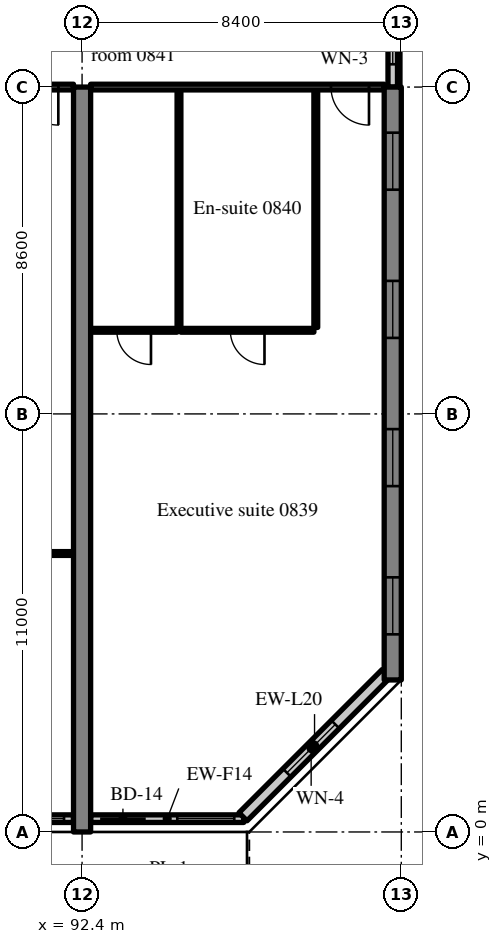
"""IFC4 building model, lengths in metres.
Left out: names, types, materials, properties, quantities, classifications, styles, units other than length and angle.
Written with IfcOpenShell. Run it as: python <this file> out.ifc"""

import sys

from ifc_helpers import new_model, si_unit, direction, frame, frame_2d, origin, place, context, subcontext, project, spatial, rectangle, extrude, source, transform, mapped, element, fill, save


model = new_model("IFC4")
c1 = context("Model", 3, precision=1e-05, world=origin(), true_north=direction((0.0, 1.0)))
c2 = subcontext(c1, "Body", "Model", "MODEL_VIEW")
j1 = project(units=[si_unit("LENGTHUNIT", "METRE"), si_unit("PLANEANGLEUNIT", "RADIAN")], contexts=[c1])
p1 = place(None, origin())
s1 = spatial("IfcSite", under=j1, at=p1, CompositionType="ELEMENT")
p2 = place(p1, origin())
s2 = spatial("IfcBuilding", under=s1, at=p2, CompositionType="ELEMENT")
p3 = place(p2, frame((0.0, 0.0, 39.2)))
s3 = spatial("IfcBuildingStorey", under=s2, at=p3, CompositionType="ELEMENT", Elevation=39.2)
m1 = source(origin(), c2, "Body", "SweptSolid", [
    extrude(rectangle(XDim=19.6, YDim=0.45, at=frame_2d((9.8, 0.0))), origin(), (0.0, 0.0, 1.0), 3.52),
])
p4 = place(p3, frame((92.4, 0.0, 0.0), z_axis=(0.0, 0.0, 1.0), x_axis=(0.0, 1.0, 0.0)))
e1 = element("IfcWall", 1, at=p4, inside=s3, PredefinedType="SHEAR", context=c2, shape_type="MappedRepresentation", body=[
    mapped(m1, transform((0.0, 0.0, 0.0), scale=1.0)),
])
m2 = source(origin(), c2, "Body", "SweptSolid", [
    extrude(rectangle(XDim=15.6, YDim=0.45, at=frame_2d((7.8, 0.0))), origin(), (0.0, 0.0, 1.0), 3.52),
])
p5 = place(p3, frame((100.575, 4.0, 0.0), z_axis=(0.0, 0.0, 1.0), x_axis=(0.0, 1.0, 0.0)))
e2 = element("IfcWall", 2, at=p5, inside=s3, PredefinedType="SHEAR", context=c2, shape_type="MappedRepresentation", body=[
    mapped(m2, transform((0.0, 0.0, 0.0), scale=1.0)),
])
m3 = source(origin(), c2, "Body", "SweptSolid", [
    extrude(rectangle(XDim=1.5, YDim=1.5, at=frame_2d((0.75, 0.75))), frame((0.0, 0.235, 0.0), z_axis=(0.0, -1.0, 0.0), x_axis=(1.0, 0.0, 0.0)), (0.0, 0.0, 1.0), 0.47),
])
p6 = place(p5, frame((1.2, 0.0, 0.9)))
e3 = element("IfcOpeningElement", 3, at=p6, cuts=e2, PredefinedType="OPENING", context=c2, shape_type="MappedRepresentation", body=[
    mapped(m3, transform((0.0, 0.0, 0.0), scale=1.0)),
])
p7 = place(p5, frame((5.1, 0.0, 0.9)))
e4 = element("IfcOpeningElement", 4, at=p7, cuts=e2, PredefinedType="OPENING", context=c2, shape_type="MappedRepresentation", body=[
    mapped(m3, transform((0.0, 0.0, 0.0), scale=1.0)),
])
p8 = place(p5, frame((9.0, 0.0, 0.9)))
e5 = element("IfcOpeningElement", 5, at=p8, cuts=e2, PredefinedType="OPENING", context=c2, shape_type="MappedRepresentation", body=[
    mapped(m3, transform((0.0, 0.0, 0.0), scale=1.0)),
])
p9 = place(p5, frame((12.9, 0.0, 0.9)))
e6 = element("IfcOpeningElement", 6, at=p9, cuts=e2, PredefinedType="OPENING", context=c2, shape_type="MappedRepresentation", body=[
    mapped(m3, transform((0.0, 0.0, 0.0), scale=1.0)),
])
m4 = source(origin(), c2, "Body", "SweptSolid", [
    extrude(rectangle(XDim=3.525, YDim=0.2, at=frame_2d((1.763, 0.0))), origin(), (0.0, 0.0, 1.0), 2.77),
])
p10 = place(p3, frame((88.65, 0.35, 0.0), z_axis=(0.0, 0.0, 1.0), x_axis=(1.0, 0.0, 0.0)))
e7 = element("IfcWall", 7, at=p10, inside=s3, PredefinedType="SOLIDWALL", context=c2, shape_type="MappedRepresentation", body=[
    mapped(m4, transform((0.0, 0.0, 0.0), scale=1.0)),
])
m5 = source(origin(), c2, "Body", "SweptSolid", [
    extrude(rectangle(XDim=1.2, YDim=2.4, at=frame_2d((0.6, 1.2))), frame((0.0, 0.11, 0.0), z_axis=(0.0, -1.0, 0.0), x_axis=(1.0, 0.0, 0.0)), (0.0, 0.0, 1.0), 0.22),
])
p11 = place(p10, frame((0.25, 0.0, 0.0)))
e8 = element("IfcOpeningElement", 8, at=p11, cuts=e7, PredefinedType="OPENING", context=c2, shape_type="MappedRepresentation", body=[
    mapped(m5, transform((0.0, 0.0, 0.0), scale=1.0)),
])
m6 = source(origin(), c2, "Body", "SweptSolid", [
    extrude(rectangle(XDim=1.5, YDim=1.5, at=frame_2d((0.75, 0.75))), frame((0.0, 0.11, 0.0), z_axis=(0.0, -1.0, 0.0), x_axis=(1.0, 0.0, 0.0)), (0.0, 0.0, 1.0), 0.22),
])
p12 = place(p10, frame((1.775, 0.0, 0.9)))
e9 = element("IfcOpeningElement", 9, at=p12, cuts=e7, PredefinedType="OPENING", context=c2, shape_type="MappedRepresentation", body=[
    mapped(m6, transform((0.0, 0.0, 0.0), scale=1.0)),
])
m7 = source(origin(), c2, "Body", "SweptSolid", [
    extrude(rectangle(XDim=4.03, YDim=0.2, at=frame_2d((2.015, 0.0))), origin(), (0.0, 0.0, 1.0), 2.77),
])
p13 = place(p3, frame((92.625, 0.35, 0.0), z_axis=(0.0, 0.0, 1.0), x_axis=(1.0, 0.0, 0.0)))
e10 = element("IfcWall", 10, at=p13, inside=s3, PredefinedType="SOLIDWALL", context=c2, shape_type="MappedRepresentation", body=[
    mapped(m7, transform((0.0, 0.0, 0.0), scale=1.0)),
])
p14 = place(p13, frame((0.25, 0.0, 0.0)))
e11 = element("IfcOpeningElement", 11, at=p14, cuts=e10, PredefinedType="OPENING", context=c2, shape_type="MappedRepresentation", body=[
    mapped(m5, transform((0.0, 0.0, 0.0), scale=1.0)),
])
p15 = place(p13, frame((2.28, 0.0, 0.9)))
e12 = element("IfcOpeningElement", 12, at=p15, cuts=e10, PredefinedType="OPENING", context=c2, shape_type="MappedRepresentation", body=[
    mapped(m6, transform((0.0, 0.0, 0.0), scale=1.0)),
])
m8 = source(origin(), c2, "Body", "SweptSolid", [
    extrude(rectangle(XDim=5.326, YDim=0.3, at=frame_2d((2.663, 0.0))), origin(), (0.0, 0.0, 1.0), 3.52),
])
p16 = place(p3, frame((96.634, 0.4, 0.0), z_axis=(0.0, 0.0, 1.0), x_axis=(0.707083859269, 0.707129702361, 0.0)))
e13 = element("IfcWall", 13, at=p16, inside=s3, PredefinedType="SOLIDWALL", context=c2, shape_type="MappedRepresentation", body=[
    mapped(m8, transform((0.0, 0.0, 0.0), scale=1.0)),
])
m9 = source(origin(), c2, "Body", "SweptSolid", [
    extrude(rectangle(XDim=1.8, YDim=1.5, at=frame_2d((0.9, 0.75))), frame((0.0, 0.16, 0.0), z_axis=(0.0, -1.0, 0.0), x_axis=(1.0, 0.0, 0.0)), (0.0, 0.0, 1.0), 0.32),
])
p17 = place(p16, frame((1.636, 0.0, 0.9)))
e14 = element("IfcOpeningElement", 14, at=p17, cuts=e13, PredefinedType="OPENING", context=c2, shape_type="MappedRepresentation", body=[
    mapped(m9, transform((0.0, 0.0, 0.0), scale=1.0)),
])
m10 = source(origin(), c2, "Body", "SweptSolid", [
    extrude(rectangle(XDim=2.4, YDim=0.25, at=frame_2d((1.2, 0.0))), origin(), (0.0, 0.0, 1.0), 2.62),
])
p18 = place(p3, frame((100.575, 19.6, 0.0), z_axis=(0.0, 0.0, 1.0), x_axis=(0.0, 1.0, 0.0)))
e15 = element("IfcWall", 15, at=p18, inside=s3, PredefinedType="SOLIDWALL", context=c2, shape_type="MappedRepresentation", body=[
    mapped(m10, transform((0.0, 0.0, 0.0), scale=1.0)),
])
m11 = source(origin(), c2, "Body", "SweptSolid", [
    extrude(rectangle(XDim=1.2, YDim=1.5, at=frame_2d((0.6, 0.75))), frame((0.0, 0.135, 0.0), z_axis=(0.0, -1.0, 0.0), x_axis=(1.0, 0.0, 0.0)), (0.0, 0.0, 1.0), 0.27),
])
p19 = place(p18, frame((0.6, 0.0, 0.9)))
e16 = element("IfcOpeningElement", 16, at=p19, cuts=e15, PredefinedType="OPENING", context=c2, shape_type="MappedRepresentation", body=[
    mapped(m11, transform((0.0, 0.0, 0.0), scale=1.0)),
])
m12 = source(origin(), c2, "Body", "SweptSolid", [
    extrude(rectangle(XDim=7.95, YDim=0.1, at=frame_2d((3.975, 0.0))), origin(), (0.0, 0.0, 1.0), 3.52),
])
p20 = place(p3, frame((84.225, 7.327, 0.0), z_axis=(0.0, 0.0, 1.0), x_axis=(1.0, 0.0, 0.0)))
e17 = element("IfcWall", 17, at=p20, inside=s3, PredefinedType="PARTITIONING", context=c2, shape_type="MappedRepresentation", body=[
    mapped(m12, transform((0.0, 0.0, 0.0), scale=1.0)),
])
m13 = source(origin(), c2, "Body", "SweptSolid", [
    extrude(rectangle(XDim=1.8, YDim=2.1, at=frame_2d((0.9, 1.05))), frame((0.0, 0.06, 0.0), z_axis=(0.0, -1.0, 0.0), x_axis=(1.0, 0.0, 0.0)), (0.0, 0.0, 1.0), 0.12),
])
p21 = place(p20, frame((3.075, 0.0, 0.0)))
e18 = element("IfcOpeningElement", 18, at=p21, cuts=e17, PredefinedType="OPENING", context=c2, shape_type="MappedRepresentation", body=[
    mapped(m13, transform((0.0, 0.0, 0.0), scale=1.0)),
])
m14 = source(origin(), c2, "Body", "SweptSolid", [
    extrude(rectangle(XDim=7.95, YDim=0.15, at=frame_2d((3.975, 0.0))), origin(), (0.0, 0.0, 1.0), 2.82),
])
p22 = place(p3, frame((84.225, 19.6, 0.0), z_axis=(0.0, 0.0, 1.0), x_axis=(1.0, 0.0, 0.0)))
e19 = element("IfcWall", 19, at=p22, inside=s3, PredefinedType="PARTITIONING", context=c2, shape_type="MappedRepresentation", body=[
    mapped(m14, transform((0.0, 0.0, 0.0), scale=1.0)),
])
m15 = source(origin(), c2, "Body", "SweptSolid", [
    extrude(rectangle(XDim=1.0, YDim=2.1, at=frame_2d((0.5, 1.05))), frame((0.0, 0.085, 0.0), z_axis=(0.0, -1.0, 0.0), x_axis=(1.0, 0.0, 0.0)), (0.0, 0.0, 1.0), 0.17),
])
p23 = place(p22, frame((6.55, 0.0, 0.0)))
e20 = element("IfcOpeningElement", 20, at=p23, cuts=e19, PredefinedType="OPENING", context=c2, shape_type="MappedRepresentation", body=[
    mapped(m15, transform((0.0, 0.0, 0.0), scale=1.0)),
])
m16 = source(origin(), c2, "Body", "SweptSolid", [
    extrude(rectangle(XDim=6.25, YDim=0.1, at=frame_2d((3.125, 0.0))), origin(), (0.0, 0.0, 1.0), 3.52),
])
for number, where, z_axis, x_axis in (
    (21, (98.55, 13.275, 0.0), (0.0, 0.0, 1.0), (0.0, 1.0, 0.0)),
    (22, (94.95, 13.275, 0.0), (0.0, 0.0, 1.0), (0.0, 1.0, 0.0)),
):
    element("IfcWall", number, at=place(p3, frame(where, z_axis=z_axis, x_axis=x_axis)), inside=s3, PredefinedType="PARTITIONING", context=c2, shape_type="MappedRepresentation", body=[
        mapped(m16, transform((0.0, 0.0, 0.0), scale=1.0)),
    ])
m17 = source(origin(), c2, "Body", "SweptSolid", [
    extrude(rectangle(XDim=3.5, YDim=0.1, at=frame_2d((1.75, 0.0))), origin(), (0.0, 0.0, 1.0), 3.52),
])
p24 = place(p3, frame((95.0, 13.2, 0.0), z_axis=(0.0, 0.0, 1.0), x_axis=(1.0, 0.0, 0.0)))
e23 = element("IfcWall", 23, at=p24, inside=s3, PredefinedType="PARTITIONING", context=c2, shape_type="MappedRepresentation", body=[
    mapped(m17, transform((0.0, 0.0, 0.0), scale=1.0)),
])
m18 = source(origin(), c2, "Body", "SweptSolid", [
    extrude(rectangle(XDim=0.9, YDim=2.1, at=frame_2d((0.45, 1.05))), frame((0.0, 0.06, 0.0), z_axis=(0.0, -1.0, 0.0), x_axis=(1.0, 0.0, 0.0)), (0.0, 0.0, 1.0), 0.12),
])
p25 = place(p24, frame((1.3, 0.0, 0.0)))
e24 = element("IfcOpeningElement", 24, at=p25, cuts=e23, PredefinedType="OPENING", context=c2, shape_type="MappedRepresentation", body=[
    mapped(m18, transform((0.0, 0.0, 0.0), scale=1.0)),
])
m19 = source(origin(), c2, "Body", "SweptSolid", [
    extrude(rectangle(XDim=2.275, YDim=0.1, at=frame_2d((1.137, 0.0))), origin(), (0.0, 0.0, 1.0), 3.52),
])
p26 = place(p3, frame((92.625, 13.2, 0.0), z_axis=(0.0, 0.0, 1.0), x_axis=(1.0, 0.0, 0.0)))
e25 = element("IfcWall", 25, at=p26, inside=s3, PredefinedType="PARTITIONING", context=c2, shape_type="MappedRepresentation", body=[
    mapped(m19, transform((0.0, 0.0, 0.0), scale=1.0)),
])
p27 = place(p26, frame((0.688, 0.0, 0.0)))
e26 = element("IfcOpeningElement", 26, at=p27, cuts=e25, PredefinedType="OPENING", context=c2, shape_type="MappedRepresentation", body=[
    mapped(m18, transform((0.0, 0.0, 0.0), scale=1.0)),
])
m20 = source(origin(), c2, "Body", "SweptSolid", [
    extrude(rectangle(XDim=7.725, YDim=0.15, at=frame_2d((3.863, 0.0))), origin(), (0.0, 0.0, 1.0), 2.82),
])
p28 = place(p3, frame((92.625, 19.6, 0.0), z_axis=(0.0, 0.0, 1.0), x_axis=(1.0, 0.0, 0.0)))
e27 = element("IfcWall", 27, at=p28, inside=s3, PredefinedType="PARTITIONING", context=c2, shape_type="MappedRepresentation", body=[
    mapped(m20, transform((0.0, 0.0, 0.0), scale=1.0)),
])
p29 = place(p28, frame((6.325, 0.0, 0.0)))
e28 = element("IfcOpeningElement", 28, at=p29, cuts=e27, PredefinedType="OPENING", context=c2, shape_type="MappedRepresentation", body=[
    mapped(m15, transform((0.0, 0.0, 0.0), scale=1.0)),
])
m21 = source(origin(), c2, "Body", "SweptSolid", [
    extrude(rectangle(XDim=1.5, YDim=1.5, at=frame_2d((0.75, 0.75))), frame((0.0, 0.03, 0.0), z_axis=(0.0, -1.0, 0.0), x_axis=(1.0, 0.0, 0.0)), (0.0, 0.0, 1.0), 0.06),
])
p30 = place(p12, origin())
e29 = element("IfcWindow", 29, at=p30, inside=s3, PartitioningType="SINGLE_PANEL", PredefinedType="WINDOW", context=c2, shape_type="MappedRepresentation", body=[
    mapped(m21, transform((0.0, 0.0, 0.0), scale=1.0)),
])
fill(e9, e29)
m22 = source(origin(), c2, "Body", "SweptSolid", [
    extrude(rectangle(XDim=1.2, YDim=2.4, at=frame_2d((0.6, 1.2))), frame((0.0, 0.025, 0.0), z_axis=(0.0, -1.0, 0.0), x_axis=(1.0, 0.0, 0.0)), (0.0, 0.0, 1.0), 0.05),
])
p31 = place(p14, origin())
e30 = element("IfcDoor", 30, at=p31, inside=s3, OperationType="SLIDING_TO_RIGHT", PredefinedType="DOOR", context=c2, shape_type="MappedRepresentation", body=[
    mapped(m22, transform((0.0, 0.0, 0.0), scale=1.0)),
])
fill(e11, e30)
p32 = place(p15, origin())
e31 = element("IfcWindow", 31, at=p32, inside=s3, PartitioningType="SINGLE_PANEL", PredefinedType="WINDOW", context=c2, shape_type="MappedRepresentation", body=[
    mapped(m21, transform((0.0, 0.0, 0.0), scale=1.0)),
])
fill(e12, e31)
m23 = source(origin(), c2, "Body", "SweptSolid", [
    extrude(rectangle(XDim=1.8, YDim=1.5, at=frame_2d((0.9, 0.75))), frame((0.0, 0.03, 0.0), z_axis=(0.0, -1.0, 0.0), x_axis=(1.0, 0.0, 0.0)), (0.0, 0.0, 1.0), 0.06),
])
p33 = place(p17, origin())
e32 = element("IfcWindow", 32, at=p33, inside=s3, PartitioningType="SINGLE_PANEL", PredefinedType="WINDOW", context=c2, shape_type="MappedRepresentation", body=[
    mapped(m23, transform((0.0, 0.0, 0.0), scale=1.0)),
])
fill(e14, e32)
p34 = place(p6, origin())
e33 = element("IfcWindow", 33, at=p34, inside=s3, PartitioningType="SINGLE_PANEL", PredefinedType="WINDOW", context=c2, shape_type="MappedRepresentation", body=[
    mapped(m21, transform((0.0, 0.0, 0.0), scale=1.0)),
])
fill(e3, e33)
p35 = place(p7, origin())
e34 = element("IfcWindow", 34, at=p35, inside=s3, PartitioningType="SINGLE_PANEL", PredefinedType="WINDOW", context=c2, shape_type="MappedRepresentation", body=[
    mapped(m21, transform((0.0, 0.0, 0.0), scale=1.0)),
])
fill(e4, e34)
p36 = place(p8, origin())
e35 = element("IfcWindow", 35, at=p36, inside=s3, PartitioningType="SINGLE_PANEL", PredefinedType="WINDOW", context=c2, shape_type="MappedRepresentation", body=[
    mapped(m21, transform((0.0, 0.0, 0.0), scale=1.0)),
])
fill(e5, e35)
p37 = place(p9, origin())
e36 = element("IfcWindow", 36, at=p37, inside=s3, PartitioningType="SINGLE_PANEL", PredefinedType="WINDOW", context=c2, shape_type="MappedRepresentation", body=[
    mapped(m21, transform((0.0, 0.0, 0.0), scale=1.0)),
])
fill(e6, e36)
m24 = source(origin(), c2, "Body", "SweptSolid", [
    extrude(rectangle(XDim=1.2, YDim=1.5, at=frame_2d((0.6, 0.75))), frame((0.0, 0.03, 0.0), z_axis=(0.0, -1.0, 0.0), x_axis=(1.0, 0.0, 0.0)), (0.0, 0.0, 1.0), 0.06),
])
p38 = place(p19, origin())
e37 = element("IfcWindow", 37, at=p38, inside=s3, PartitioningType="SINGLE_PANEL", PredefinedType="WINDOW", context=c2, shape_type="MappedRepresentation", body=[
    mapped(m24, transform((0.0, 0.0, 0.0), scale=1.0)),
])
fill(e16, e37)
m25 = source(origin(), c2, "Body", "SweptSolid", [
    extrude(rectangle(XDim=1.0, YDim=2.1, at=frame_2d((0.5, 1.05))), frame((0.0, 0.025, 0.0), z_axis=(0.0, -1.0, 0.0), x_axis=(1.0, 0.0, 0.0)), (0.0, 0.0, 1.0), 0.05),
])
p39 = place(p23, origin())
e38 = element("IfcDoor", 38, at=p39, inside=s3, OperationType="SINGLE_SWING_RIGHT", PredefinedType="DOOR", context=c2, shape_type="MappedRepresentation", body=[
    mapped(m25, transform((0.0, 0.0, 0.0), scale=1.0)),
])
fill(e20, e38)
m26 = source(origin(), c2, "Body", "SweptSolid", [
    extrude(rectangle(XDim=0.9, YDim=2.1, at=frame_2d((0.45, 1.05))), frame((0.0, 0.025, 0.0), z_axis=(0.0, -1.0, 0.0), x_axis=(1.0, 0.0, 0.0)), (0.0, 0.0, 1.0), 0.05),
])
p40 = place(p25, origin())
e39 = element("IfcDoor", 39, at=p40, inside=s3, OperationType="SINGLE_SWING_RIGHT", PredefinedType="DOOR", context=c2, shape_type="MappedRepresentation", body=[
    mapped(m26, transform((0.0, 0.0, 0.0), scale=1.0)),
])
fill(e24, e39)
p41 = place(p27, origin())
e40 = element("IfcDoor", 40, at=p41, inside=s3, OperationType="SINGLE_SWING_RIGHT", PredefinedType="DOOR", context=c2, shape_type="MappedRepresentation", body=[
    mapped(m26, transform((0.0, 0.0, 0.0), scale=1.0)),
])
fill(e26, e40)
p42 = place(p29, origin())
e41 = element("IfcDoor", 41, at=p42, inside=s3, OperationType="SINGLE_SWING_RIGHT", PredefinedType="DOOR", context=c2, shape_type="MappedRepresentation", body=[
    mapped(m25, transform((0.0, 0.0, 0.0), scale=1.0)),
])
fill(e28, e41)
save(model, sys.argv[1])
